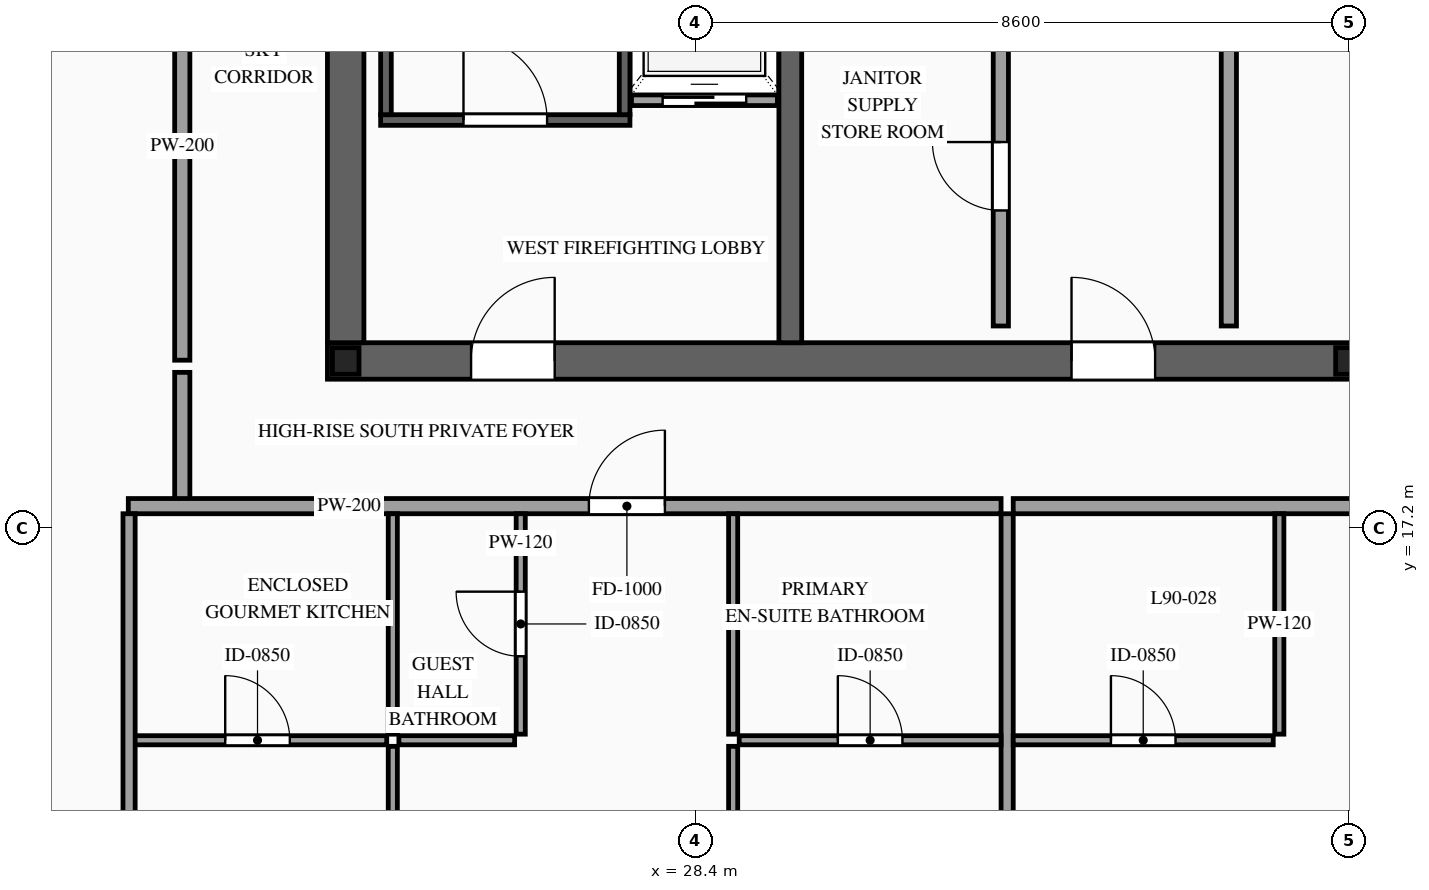
"""IFC4 building model, lengths in metres.
Left out: names, types, materials, properties, quantities, classifications, styles, units other than length and angle.
Written with IfcOpenShell. Run it as: python <this file> out.ifc"""

import sys

from ifc_helpers import new_model, si_unit, direction, frame, frame_2d, origin, origin_2d, place, context, subcontext, project, spatial, rectangle, i_section, extrude, source, transform, mapped, element, fill, save


model = new_model("IFC4")
c1 = context("Model", 3, precision=1e-05, world=origin(), true_north=direction((0.0, 1.0)))
c2 = subcontext(c1, "Body", "Model", "MODEL_VIEW")
j1 = project(units=[si_unit("LENGTHUNIT", "METRE"), si_unit("PLANEANGLEUNIT", "RADIAN")], contexts=[c1])
p1 = place(None, origin())
s1 = spatial("IfcSite", under=j1, at=p1, CompositionType="ELEMENT")
p2 = place(p1, origin())
s2 = spatial("IfcBuilding", under=s1, at=p2, CompositionType="ELEMENT")
p3 = place(p2, frame((0.0, 0.0, 335.7)))
s3 = spatial("IfcBuildingStorey", under=s2, at=p3, CompositionType="ELEMENT", Elevation=335.7)
p4 = place(p3, frame((23.56, 19.4, 0.0), z_axis=(0.0, 0.0, 1.0), x_axis=(1.0, 0.0, 0.0)))
e1 = element("IfcWall", 1, at=p4, inside=s3, PredefinedType="SHEAR", context=c2, shape_type="SweptSolid", body=[
    extrude(rectangle(XDim=26.88, YDim=0.48, at=frame_2d((13.44, 0.0))), origin(), (0.0, 0.0, 1.0), 3.5),
])
p5 = place(p4, frame((1.89, 0.0, 0.0)))
e2 = element("IfcOpeningElement", 2, at=p5, cuts=e1, PredefinedType="OPENING", context=c2, shape_type="SweptSolid", body=[
    extrude(rectangle(XDim=1.1, YDim=2.2, at=frame_2d((0.55, 1.1))), frame((0.0, 0.255, 0.0), z_axis=(0.0, -1.0, 0.0), x_axis=(1.0, 0.0, 0.0)), (0.0, 0.0, 1.0), 0.51),
])
p6 = place(p4, frame((9.79, 0.0, 0.0)))
e3 = element("IfcOpeningElement", 3, at=p6, cuts=e1, PredefinedType="OPENING", context=c2, shape_type="SweptSolid", body=[
    extrude(rectangle(XDim=1.1, YDim=2.2, at=frame_2d((0.55, 1.1))), frame((0.0, 0.255, 0.0), z_axis=(0.0, -1.0, 0.0), x_axis=(1.0, 0.0, 0.0)), (0.0, 0.0, 1.0), 0.51),
])
p7 = place(p4, frame((22.99, 0.0, 0.0)))
e4 = element("IfcOpeningElement", 4, at=p7, cuts=e1, PredefinedType="OPENING", context=c2, shape_type="SweptSolid", body=[
    extrude(rectangle(XDim=1.1, YDim=2.2, at=frame_2d((0.55, 1.1))), frame((0.0, 0.255, 0.0), z_axis=(0.0, -1.0, 0.0), x_axis=(1.0, 0.0, 0.0)), (0.0, 0.0, 1.0), 0.51),
])
p8 = place(p4, frame((19.61, 0.0, 0.0)))
e5 = element("IfcOpeningElement", 5, at=p8, cuts=e1, PredefinedType="OPENING", context=c2, shape_type="SweptSolid", body=[
    extrude(rectangle(XDim=0.9, YDim=2.15, at=frame_2d((0.45, 1.075))), frame((0.0, 0.255, 0.0), z_axis=(0.0, -1.0, 0.0), x_axis=(1.0, 0.0, 0.0)), (0.0, 0.0, 1.0), 0.51),
])
p9 = place(p4, frame((18.17, 0.0, 0.0)))
e6 = element("IfcOpeningElement", 6, at=p9, cuts=e1, PredefinedType="OPENING", context=c2, shape_type="SweptSolid", body=[
    extrude(rectangle(XDim=0.9, YDim=2.15, at=frame_2d((0.45, 1.075))), frame((0.0, 0.255, 0.0), z_axis=(0.0, -1.0, 0.0), x_axis=(1.0, 0.0, 0.0)), (0.0, 0.0, 1.0), 0.51),
])
m1 = source(origin(), c2, "Body", "SweptSolid", [
    extrude(rectangle(XDim=12.32, YDim=0.48, at=frame_2d((6.16, 0.0))), origin(), (0.0, 0.0, 1.0), 3.5),
])
p10 = place(p3, frame((23.8, 19.64, 0.0), z_axis=(0.0, 0.0, 1.0), x_axis=(0.0, 1.0, 0.0)))
e7 = element("IfcWall", 7, at=p10, inside=s3, PredefinedType="SHEAR", context=c2, shape_type="MappedRepresentation", body=[
    mapped(m1, transform((0.0, 0.0, 0.0), scale=1.0)),
])
m2 = source(origin(), c2, "Body", "SweptSolid", [
    extrude(rectangle(XDim=12.32, YDim=0.3, at=frame_2d((6.16, 0.0))), origin(), (0.0, 0.0, 1.0), 3.5),
])
p11 = place(p3, frame((29.65, 19.64, 0.0), z_axis=(0.0, 0.0, 1.0), x_axis=(0.0, 1.0, 0.0)))
e8 = element("IfcWall", 8, at=p11, inside=s3, PredefinedType="SOLIDWALL", context=c2, shape_type="MappedRepresentation", body=[
    mapped(m2, transform((0.0, 0.0, 0.0), scale=1.0)),
])
m3 = source(origin(), c2, "Body", "SweptSolid", [
    extrude(i_section(OverallWidth=0.35, OverallDepth=0.35, WebThickness=0.012, FlangeThickness=0.019, at=origin_2d()), origin(), (0.0, 0.0, 1.0), 3.5),
])
for number, where, z_axis, x_axis in (
    (9, (23.8, 19.4, 0.0), (0.0, 0.0, 1.0), (1.0, 0.0, 0.0)),
    (10, (37.0, 19.4, 0.0), (0.0, 0.0, 1.0), (1.0, 0.0, 0.0)),
):
    element("IfcColumn", number, at=place(p3, frame(where, z_axis=z_axis, x_axis=x_axis)), inside=s3, PredefinedType="COLUMN", context=c2, shape_type="MappedRepresentation", body=[
        mapped(m3, transform((0.0, 0.0, 0.0), scale=1.0)),
    ])
p12 = place(p3, frame((27.56, 22.83, 0.0), z_axis=(0.0, 0.0, 1.0), x_axis=(1.0, 0.0, 0.0)))
e11 = element("IfcWall", 11, at=p12, inside=s3, PredefinedType="SOLIDWALL", context=c2, shape_type="SweptSolid", body=[
    extrude(rectangle(XDim=1.92, YDim=0.14, at=frame_2d((0.96, 0.0))), origin(), (0.0, 0.0, 1.0), 3.26),
])
p13 = place(p12, frame((0.41, 0.0, 0.0)))
e12 = element("IfcOpeningElement", 12, at=p13, cuts=e11, PredefinedType="OPENING", context=c2, shape_type="SweptSolid", body=[
    extrude(rectangle(XDim=1.1, YDim=2.2, at=frame_2d((0.55, 1.1))), frame((0.0, 0.085, 0.0), z_axis=(0.0, -1.0, 0.0), x_axis=(1.0, 0.0, 0.0)), (0.0, 0.0, 1.0), 0.17),
])
p14 = place(p3, frame((24.26, 22.57, 0.0), z_axis=(0.0, 0.0, 1.0), x_axis=(1.0, 0.0, 0.0)))
e13 = element("IfcWall", 13, at=p14, inside=s3, PredefinedType="SOLIDWALL", context=c2, shape_type="SweptSolid", body=[
    extrude(rectangle(XDim=3.28, YDim=0.14, at=frame_2d((1.64, 0.0))), origin(), (0.0, 0.0, 1.0), 3.26),
])
p15 = place(p14, frame((1.09, 0.0, 0.0)))
e14 = element("IfcOpeningElement", 14, at=p15, cuts=e13, PredefinedType="OPENING", context=c2, shape_type="SweptSolid", body=[
    extrude(rectangle(XDim=1.1, YDim=2.2, at=frame_2d((0.55, 1.1))), frame((0.0, 0.085, 0.0), z_axis=(0.0, -1.0, 0.0), x_axis=(1.0, 0.0, 0.0)), (0.0, 0.0, 1.0), 0.17),
])
m4 = source(origin(), c2, "Body", "SweptSolid", [
    extrude(rectangle(XDim=8.94, YDim=0.14, at=frame_2d((4.47, 0.0))), origin(), (0.0, 0.0, 1.0), 3.26),
])
for number, where, z_axis, x_axis in (
    (15, (24.33, 22.64, 0.0), (0.0, 0.0, 1.0), (0.0, 1.0, 0.0)),
    (16, (27.47, 22.64, 0.0), (0.0, 0.0, 1.0), (0.0, 1.0, 0.0)),
):
    element("IfcWall", number, at=place(p3, frame(where, z_axis=z_axis, x_axis=x_axis)), inside=s3, PredefinedType="SOLIDWALL", context=c2, shape_type="MappedRepresentation", body=[
        mapped(m4, transform((0.0, 0.0, 0.0), scale=1.0)),
    ])
p16 = place(p3, frame((32.42, 19.86, 0.0), z_axis=(0.0, 0.0, 1.0), x_axis=(0.0, 1.0, 0.0)))
e17 = element("IfcWall", 17, at=p16, inside=s3, PredefinedType="PARTITIONING", context=c2, shape_type="SweptSolid", body=[
    extrude(rectangle(XDim=3.94, YDim=0.2, at=frame_2d((1.97, 0.0))), origin(), (0.0, 0.0, 1.0), 3.26),
])
p17 = place(p16, frame((1.52, 0.0, 0.0)))
e18 = element("IfcOpeningElement", 18, at=p17, cuts=e17, PredefinedType="OPENING", context=c2, shape_type="SweptSolid", body=[
    extrude(rectangle(XDim=0.9, YDim=2.15, at=frame_2d((0.45, 1.075))), frame((0.0, 0.115, 0.0), z_axis=(0.0, -1.0, 0.0), x_axis=(1.0, 0.0, 0.0)), (0.0, 0.0, 1.0), 0.23),
])
p18 = place(p3, frame((35.42, 19.86, 0.0), z_axis=(0.0, 0.0, 1.0), x_axis=(0.0, 1.0, 0.0)))
e19 = element("IfcWall", 19, at=p18, inside=s3, PredefinedType="PARTITIONING", context=c2, shape_type="SweptSolid", body=[
    extrude(rectangle(XDim=9.19, YDim=0.2, at=frame_2d((4.595, 0.0))), origin(), (0.0, 0.0, 1.0), 3.26),
])
p19 = place(p18, frame((4.145, 0.0, 0.0)))
e20 = element("IfcOpeningElement", 20, at=p19, cuts=e19, PredefinedType="OPENING", context=c2, shape_type="SweptSolid", body=[
    extrude(rectangle(XDim=0.9, YDim=2.15, at=frame_2d((0.45, 1.075))), frame((0.0, 0.115, 0.0), z_axis=(0.0, -1.0, 0.0), x_axis=(1.0, 0.0, 0.0)), (0.0, 0.0, 1.0), 0.23),
])
m5 = source(origin(), c2, "Body", "SweptSolid", [
    extrude(rectangle(XDim=1.7, YDim=0.2, at=frame_2d((0.85, 0.0))), origin(), (0.0, 0.0, 1.0), 3.26),
])
p20 = place(p3, frame((21.65, 17.55, 0.0), z_axis=(0.0, 0.0, 1.0), x_axis=(0.0, 1.0, 0.0)))
e21 = element("IfcWall", 21, at=p20, inside=s3, PredefinedType="PARTITIONING", context=c2, shape_type="MappedRepresentation", body=[
    mapped(m5, transform((0.0, 0.0, 0.0), scale=1.0)),
])
p21 = place(p3, frame((20.94, 17.49, 0.0), z_axis=(0.0, 0.0, 1.0), x_axis=(1.0, 0.0, 0.0)))
e22 = element("IfcWall", 22, at=p21, inside=s3, PredefinedType="PARTITIONING", context=c2, shape_type="SweptSolid", body=[
    extrude(rectangle(XDim=11.483, YDim=0.2, at=frame_2d((5.742, 0.0))), origin(), (0.0, 0.0, 1.0), 3.26),
])
p22 = place(p21, frame((6.06, 0.0, 0.0)))
e23 = element("IfcOpeningElement", 23, at=p22, cuts=e22, PredefinedType="OPENING", context=c2, shape_type="SweptSolid", body=[
    extrude(rectangle(XDim=1.0, YDim=2.2, at=frame_2d((0.5, 1.1))), frame((0.0, 0.115, 0.0), z_axis=(0.0, -1.0, 0.0), x_axis=(1.0, 0.0, 0.0)), (0.0, 0.0, 1.0), 0.23),
])
m6 = source(origin(), c2, "Body", "SweptSolid", [
    extrude(rectangle(XDim=10.54, YDim=0.16, at=frame_2d((5.27, 0.0))), origin(), (0.0, 0.0, 1.0), 3.26),
])
p23 = place(p3, frame((32.503, 6.85, 0.0), z_axis=(0.0, 0.0, 1.0), x_axis=(0.0, 1.0, 0.0)))
e24 = element("IfcWall", 24, at=p23, inside=s3, PredefinedType="PARTITIONING", context=c2, shape_type="MappedRepresentation", body=[
    mapped(m6, transform((0.0, 0.0, 0.0), scale=1.0)),
])
p24 = place(p3, frame((20.94, 14.41, 0.0), z_axis=(0.0, 0.0, 1.0), x_axis=(1.0, 0.0, 0.0)))
e25 = element("IfcWall", 25, at=p24, inside=s3, PredefinedType="PARTITIONING", context=c2, shape_type="SweptSolid", body=[
    extrude(rectangle(XDim=3.4, YDim=0.12, at=frame_2d((1.7, 0.0))), origin(), (0.0, 0.0, 1.0), 3.26),
])
p25 = place(p24, frame((1.275, 0.0, 0.0)))
e26 = element("IfcOpeningElement", 26, at=p25, cuts=e25, PredefinedType="OPENING", context=c2, shape_type="SweptSolid", body=[
    extrude(rectangle(XDim=0.85, YDim=2.1, at=frame_2d((0.425, 1.05))), frame((0.0, 0.075, 0.0), z_axis=(0.0, -1.0, 0.0), x_axis=(1.0, 0.0, 0.0)), (0.0, 0.0, 1.0), 0.15),
])
m7 = source(origin(), c2, "Body", "SweptSolid", [
    extrude(rectangle(XDim=2.9, YDim=0.12, at=frame_2d((1.45, 0.0))), origin(), (0.0, 0.0, 1.0), 3.26),
])
p26 = place(p3, frame((24.42, 14.49, 0.0), z_axis=(0.0, 0.0, 1.0), x_axis=(0.0, 1.0, 0.0)))
e27 = element("IfcWall", 27, at=p26, inside=s3, PredefinedType="PARTITIONING", context=c2, shape_type="MappedRepresentation", body=[
    mapped(m7, transform((0.0, 0.0, 0.0), scale=1.0)),
])
m8 = source(origin(), c2, "Body", "SweptSolid", [
    extrude(rectangle(XDim=1.523, YDim=0.12, at=frame_2d((0.761, 0.0))), origin(), (0.0, 0.0, 1.0), 3.26),
])
p27 = place(p3, frame((24.5, 14.41, 0.0), z_axis=(0.0, 0.0, 1.0), x_axis=(1.0, 0.0, 0.0)))
e28 = element("IfcWall", 28, at=p27, inside=s3, PredefinedType="PARTITIONING", context=c2, shape_type="MappedRepresentation", body=[
    mapped(m8, transform((0.0, 0.0, 0.0), scale=1.0)),
])
p28 = place(p3, frame((26.103, 14.49, 0.0), z_axis=(0.0, 0.0, 1.0), x_axis=(0.0, 1.0, 0.0)))
e29 = element("IfcWall", 29, at=p28, inside=s3, PredefinedType="PARTITIONING", context=c2, shape_type="SweptSolid", body=[
    extrude(rectangle(XDim=2.9, YDim=0.12, at=frame_2d((1.45, 0.0))), origin(), (0.0, 0.0, 1.0), 3.26),
])
p29 = place(p28, frame((1.025, 0.0, 0.0)))
e30 = element("IfcOpeningElement", 30, at=p29, cuts=e29, PredefinedType="OPENING", context=c2, shape_type="SweptSolid", body=[
    extrude(rectangle(XDim=0.85, YDim=2.1, at=frame_2d((0.425, 1.05))), frame((0.0, 0.075, 0.0), z_axis=(0.0, -1.0, 0.0), x_axis=(1.0, 0.0, 0.0)), (0.0, 0.0, 1.0), 0.15),
])
p30 = place(p3, frame((28.978, 14.41, 0.0), z_axis=(0.0, 0.0, 1.0), x_axis=(1.0, 0.0, 0.0)))
e31 = element("IfcWall", 31, at=p30, inside=s3, PredefinedType="PARTITIONING", context=c2, shape_type="SweptSolid", body=[
    extrude(rectangle(XDim=3.445, YDim=0.12, at=frame_2d((1.723, 0.0))), origin(), (0.0, 0.0, 1.0), 3.26),
])
p31 = place(p30, frame((1.298, 0.0, 0.0)))
e32 = element("IfcOpeningElement", 32, at=p31, cuts=e31, PredefinedType="OPENING", context=c2, shape_type="SweptSolid", body=[
    extrude(rectangle(XDim=0.85, YDim=2.1, at=frame_2d((0.425, 1.05))), frame((0.0, 0.075, 0.0), z_axis=(0.0, -1.0, 0.0), x_axis=(1.0, 0.0, 0.0)), (0.0, 0.0, 1.0), 0.15),
])
p32 = place(p3, frame((28.898, 14.49, 0.0), z_axis=(0.0, 0.0, 1.0), x_axis=(0.0, 1.0, 0.0)))
e33 = element("IfcWall", 33, at=p32, inside=s3, PredefinedType="PARTITIONING", context=c2, shape_type="MappedRepresentation", body=[
    mapped(m7, transform((0.0, 0.0, 0.0), scale=1.0)),
])
p33 = place(p3, frame((24.42, 6.85, 0.0), z_axis=(0.0, 0.0, 1.0), x_axis=(0.0, 1.0, 0.0)))
e34 = element("IfcWall", 34, at=p33, inside=s3, PredefinedType="PARTITIONING", context=c2, shape_type="SweptSolid", body=[
    extrude(rectangle(XDim=7.48, YDim=0.12, at=frame_2d((3.74, 0.0))), origin(), (0.0, 0.0, 1.0), 3.26),
])
p34 = place(p33, frame((3.29, 0.0, 0.0)))
e35 = element("IfcOpeningElement", 35, at=p34, cuts=e34, PredefinedType="OPENING", context=c2, shape_type="SweptSolid", body=[
    extrude(rectangle(XDim=0.9, YDim=2.15, at=frame_2d((0.45, 1.075))), frame((0.0, 0.075, 0.0), z_axis=(0.0, -1.0, 0.0), x_axis=(1.0, 0.0, 0.0)), (0.0, 0.0, 1.0), 0.15),
])
p35 = place(p3, frame((28.898, 6.85, 0.0), z_axis=(0.0, 0.0, 1.0), x_axis=(0.0, 1.0, 0.0)))
e36 = element("IfcWall", 36, at=p35, inside=s3, PredefinedType="PARTITIONING", context=c2, shape_type="SweptSolid", body=[
    extrude(rectangle(XDim=7.48, YDim=0.12, at=frame_2d((3.74, 0.0))), origin(), (0.0, 0.0, 1.0), 3.26),
])
p36 = place(p35, frame((3.29, 0.0, 0.0)))
e37 = element("IfcOpeningElement", 37, at=p36, cuts=e36, PredefinedType="OPENING", context=c2, shape_type="SweptSolid", body=[
    extrude(rectangle(XDim=0.9, YDim=2.15, at=frame_2d((0.45, 1.075))), frame((0.0, 0.075, 0.0), z_axis=(0.0, -1.0, 0.0), x_axis=(1.0, 0.0, 0.0)), (0.0, 0.0, 1.0), 0.15),
])
p37 = place(p3, frame((32.583, 17.49, 0.0), z_axis=(0.0, 0.0, 1.0), x_axis=(1.0, 0.0, 0.0)))
e38 = element("IfcWall", 38, at=p37, inside=s3, PredefinedType="PARTITIONING", context=c2, shape_type="SweptSolid", body=[
    extrude(rectangle(XDim=11.403, YDim=0.2, at=frame_2d((5.702, 0.0))), origin(), (0.0, 0.0, 1.0), 3.26),
])
p38 = place(p37, frame((4.517, 0.0, 0.0)))
e39 = element("IfcOpeningElement", 39, at=p38, cuts=e38, PredefinedType="OPENING", context=c2, shape_type="SweptSolid", body=[
    extrude(rectangle(XDim=1.0, YDim=2.2, at=frame_2d((0.5, 1.1))), frame((0.0, 0.115, 0.0), z_axis=(0.0, -1.0, 0.0), x_axis=(1.0, 0.0, 0.0)), (0.0, 0.0, 1.0), 0.23),
])
p39 = place(p3, frame((32.583, 14.41, 0.0), z_axis=(0.0, 0.0, 1.0), x_axis=(1.0, 0.0, 0.0)))
e40 = element("IfcWall", 40, at=p39, inside=s3, PredefinedType="PARTITIONING", context=c2, shape_type="SweptSolid", body=[
    extrude(rectangle(XDim=3.421, YDim=0.12, at=frame_2d((1.71, 0.0))), origin(), (0.0, 0.0, 1.0), 3.26),
])
p40 = place(p39, frame((1.285, 0.0, 0.0)))
e41 = element("IfcOpeningElement", 41, at=p40, cuts=e40, PredefinedType="OPENING", context=c2, shape_type="SweptSolid", body=[
    extrude(rectangle(XDim=0.85, YDim=2.1, at=frame_2d((0.425, 1.05))), frame((0.0, 0.075, 0.0), z_axis=(0.0, -1.0, 0.0), x_axis=(1.0, 0.0, 0.0)), (0.0, 0.0, 1.0), 0.15),
])
p41 = place(p3, frame((36.084, 14.49, 0.0), z_axis=(0.0, 0.0, 1.0), x_axis=(0.0, 1.0, 0.0)))
e42 = element("IfcWall", 42, at=p41, inside=s3, PredefinedType="PARTITIONING", context=c2, shape_type="MappedRepresentation", body=[
    mapped(m7, transform((0.0, 0.0, 0.0), scale=1.0)),
])
m9 = source(origin(), c2, "Body", "SweptSolid", [
    extrude(rectangle(XDim=10.39, YDim=0.16, at=frame_2d((5.195, 0.0))), origin(), (0.0, 0.0, 1.0), 3.26),
])
p42 = place(p3, frame((20.95, 7.0, 0.0), z_axis=(0.0, 0.0, 1.0), x_axis=(0.0, 1.0, 0.0)))
e43 = element("IfcWall", 43, at=p42, inside=s3, PredefinedType="PARTITIONING", context=c2, shape_type="MappedRepresentation", body=[
    mapped(m9, transform((0.0, 0.0, 0.0), scale=1.0)),
])
p43 = place(p3, frame((21.65, 19.41, 0.0), z_axis=(0.0, 0.0, 1.0), x_axis=(0.0, 1.0, 0.0)))
e44 = element("IfcWall", 44, at=p43, inside=s3, PredefinedType="PARTITIONING", context=c2, shape_type="SweptSolid", body=[
    extrude(rectangle(XDim=12.78, YDim=0.2, at=frame_2d((6.39, 0.0))), origin(), (0.0, 0.0, 1.0), 3.26),
])
p44 = place(p43, frame((5.89, 0.0, 0.0)))
e45 = element("IfcOpeningElement", 45, at=p44, cuts=e44, PredefinedType="OPENING", context=c2, shape_type="SweptSolid", body=[
    extrude(rectangle(XDim=1.0, YDim=2.2, at=frame_2d((0.5, 1.1))), frame((0.0, 0.115, 0.0), z_axis=(0.0, -1.0, 0.0), x_axis=(1.0, 0.0, 0.0)), (0.0, 0.0, 1.0), 0.23),
])
m10 = source(origin(), c2, "Body", "SweptSolid", [
    extrude(rectangle(XDim=1.1, YDim=2.2, at=frame_2d((0.55, 1.1))), frame((0.0, 0.025, 0.0), z_axis=(0.0, -1.0, 0.0), x_axis=(1.0, 0.0, 0.0)), (0.0, 0.0, 1.0), 0.05),
])
p45 = place(p13, origin())
e46 = element("IfcDoor", 46, at=p45, inside=s3, OperationType="SLIDING_TO_LEFT", PredefinedType="DOOR", context=c2, shape_type="MappedRepresentation", body=[
    mapped(m10, transform((0.0, 0.0, 0.0), scale=1.0)),
])
fill(e12, e46)
m11 = source(origin(), c2, "Body", "SweptSolid", [
    extrude(rectangle(XDim=1.1, YDim=2.2, at=frame_2d((0.55, 1.1))), frame((0.0, 0.025, 0.0), z_axis=(0.0, -1.0, 0.0), x_axis=(1.0, 0.0, 0.0)), (0.0, 0.0, 1.0), 0.05),
])
p46 = place(p15, origin())
e47 = element("IfcDoor", 47, at=p46, inside=s3, OperationType="SINGLE_SWING_LEFT", PredefinedType="DOOR", context=c2, shape_type="MappedRepresentation", body=[
    mapped(m11, transform((0.0, 0.0, 0.0), scale=1.0)),
])
fill(e14, e47)
p47 = place(p5, origin())
e48 = element("IfcDoor", 48, at=p47, inside=s3, OperationType="SINGLE_SWING_RIGHT", PredefinedType="DOOR", context=c2, shape_type="MappedRepresentation", body=[
    mapped(m11, transform((0.0, 0.0, 0.0), scale=1.0)),
])
fill(e2, e48)
p48 = place(p6, origin())
e49 = element("IfcDoor", 49, at=p48, inside=s3, OperationType="SINGLE_SWING_LEFT", PredefinedType="DOOR", context=c2, shape_type="MappedRepresentation", body=[
    mapped(m11, transform((0.0, 0.0, 0.0), scale=1.0)),
])
fill(e3, e49)
m12 = source(origin(), c2, "Body", "SweptSolid", [
    extrude(rectangle(XDim=0.9, YDim=2.15, at=frame_2d((0.45, 1.075))), frame((0.0, 0.025, 0.0), z_axis=(0.0, -1.0, 0.0), x_axis=(1.0, 0.0, 0.0)), (0.0, 0.0, 1.0), 0.05),
])
p49 = place(p17, origin())
e50 = element("IfcDoor", 50, at=p49, inside=s3, OperationType="SINGLE_SWING_RIGHT", PredefinedType="DOOR", context=c2, shape_type="MappedRepresentation", body=[
    mapped(m12, transform((0.0, 0.0, 0.0), scale=1.0)),
])
fill(e18, e50)
m13 = source(origin(), c2, "Body", "SweptSolid", [
    extrude(rectangle(XDim=1.0, YDim=2.2, at=frame_2d((0.5, 1.1))), frame((0.0, 0.025, 0.0), z_axis=(0.0, -1.0, 0.0), x_axis=(1.0, 0.0, 0.0)), (0.0, 0.0, 1.0), 0.05),
])
p50 = place(p22, origin())
e51 = element("IfcDoor", 51, at=p50, inside=s3, OperationType="SINGLE_SWING_RIGHT", PredefinedType="DOOR", context=c2, shape_type="MappedRepresentation", body=[
    mapped(m13, transform((0.0, 0.0, 0.0), scale=1.0)),
])
fill(e23, e51)
m14 = source(origin(), c2, "Body", "SweptSolid", [
    extrude(rectangle(XDim=0.85, YDim=2.1, at=frame_2d((0.425, 1.05))), frame((0.0, 0.025, 0.0), z_axis=(0.0, -1.0, 0.0), x_axis=(1.0, 0.0, 0.0)), (0.0, 0.0, 1.0), 0.05),
])
p51 = place(p25, origin())
e52 = element("IfcDoor", 52, at=p51, inside=s3, OperationType="SINGLE_SWING_LEFT", PredefinedType="DOOR", context=c2, shape_type="MappedRepresentation", body=[
    mapped(m14, transform((0.0, 0.0, 0.0), scale=1.0)),
])
fill(e26, e52)
p52 = place(p29, origin())
e53 = element("IfcDoor", 53, at=p52, inside=s3, OperationType="SINGLE_SWING_RIGHT", PredefinedType="DOOR", context=c2, shape_type="MappedRepresentation", body=[
    mapped(m14, transform((0.0, 0.0, 0.0), scale=1.0)),
])
fill(e30, e53)
p53 = place(p31, origin())
e54 = element("IfcDoor", 54, at=p53, inside=s3, OperationType="SINGLE_SWING_LEFT", PredefinedType="DOOR", context=c2, shape_type="MappedRepresentation", body=[
    mapped(m14, transform((0.0, 0.0, 0.0), scale=1.0)),
])
fill(e32, e54)
p54 = place(p40, origin())
e55 = element("IfcDoor", 55, at=p54, inside=s3, OperationType="SINGLE_SWING_LEFT", PredefinedType="DOOR", context=c2, shape_type="MappedRepresentation", body=[
    mapped(m14, transform((0.0, 0.0, 0.0), scale=1.0)),
])
fill(e41, e55)
save(model, sys.argv[1])
